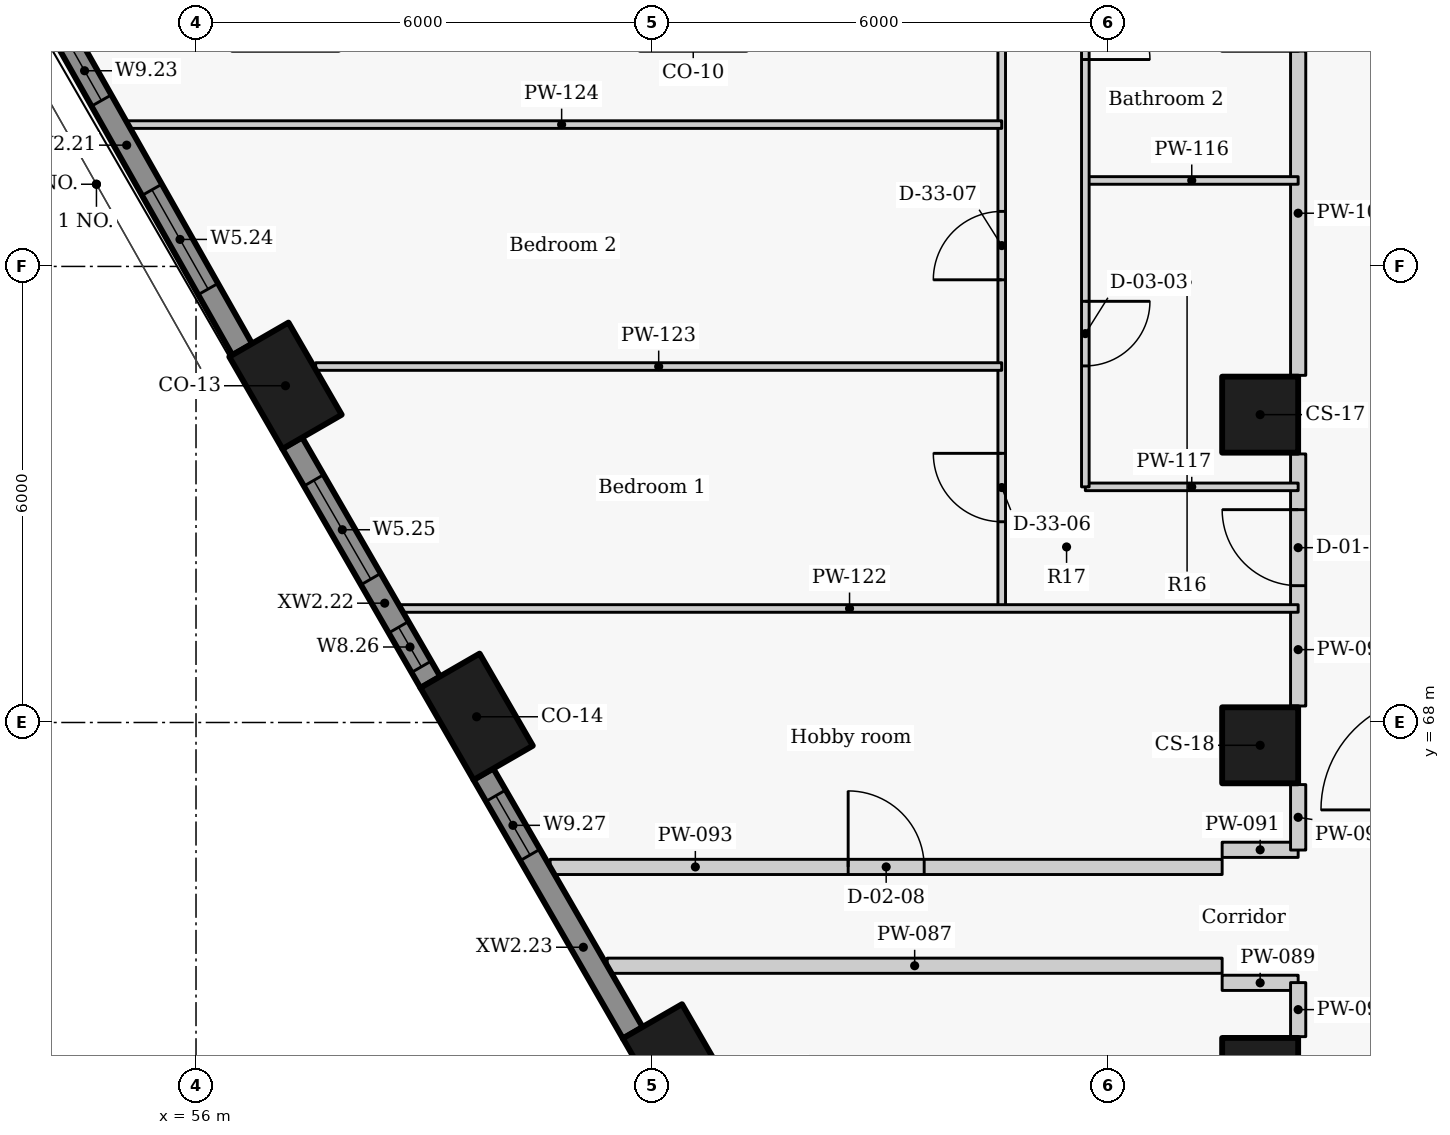
"""IFC4 building model, lengths in metres.
Left out: names, types, materials, properties, quantities, classifications, styles, units other than length and angle.
Written with IfcOpenShell. Run it as: python <this file> out.ifc"""

import sys

from ifc_helpers import new_model, si_unit, direction, frame, frame_2d, origin, origin_2d, place, context, subcontext, project, spatial, rectangle, extrude, element, fill, save


model = new_model("IFC4")
c1 = context("Model", 3, precision=1e-05, world=origin(), true_north=direction((0.0, 1.0)))
c2 = subcontext(c1, "Body", "Model", "MODEL_VIEW")
j1 = project(units=[si_unit("LENGTHUNIT", "METRE"), si_unit("PLANEANGLEUNIT", "RADIAN")], contexts=[c1])
p1 = place(None, origin())
s1 = spatial("IfcSite", under=j1, at=p1, CompositionType="ELEMENT")
p2 = place(p1, origin())
s2 = spatial("IfcBuilding", under=s1, at=p2, CompositionType="ELEMENT")
p3 = place(p2, frame((0.0, 0.0, 87.6)))
s3 = spatial("IfcBuildingStorey", under=s2, at=p3, CompositionType="ELEMENT", Elevation=87.6)
for number, where, z_axis, x_axis in (
    (1, (57.177, 72.43, 0.0), (0.0, 0.0, 1.0), (0.5, -0.866, 0.0)),
    (2, (59.692, 68.075, 0.0), (0.0, 0.0, 1.0), (0.5, -0.866, 0.0)),
    (3, (62.354, 63.463, 0.0), (0.0, 0.0, 1.0), (0.5, -0.866, 0.0)),
):
    element("IfcColumn", number, at=place(p3, frame(where, z_axis=z_axis, x_axis=x_axis)), inside=s3, PredefinedType="COLUMN", context=c2, shape_type="SweptSolid", body=[
        extrude(rectangle(XDim=1.4, YDim=0.9, at=origin_2d()), origin(), (0.0, 0.0, 1.0), 3.3),
    ])
for number, where, z_axis, x_axis in (
    (4, (70.0, 72.05, 0.0), (0.0, 0.0, 1.0), (0.0, -1.0, 0.0)),
    (5, (70.0, 67.7, 0.0), (0.0, 0.0, 1.0), (0.0, -1.0, 0.0)),
    (6, (70.0, 63.35, 0.0), (0.0, 0.0, 1.0), (0.0, -1.0, 0.0)),
):
    element("IfcColumn", number, at=place(p3, frame(where, z_axis=z_axis, x_axis=x_axis)), inside=s3, PredefinedType="COLUMN", context=c2, shape_type="SweptSolid", body=[
        extrude(rectangle(XDim=1.0, YDim=1.0, at=origin_2d()), origin(), (0.0, 0.0, 1.0), 3.3),
    ])
p4 = place(p3, frame((53.814, 77.847, 0.0), z_axis=(0.0, 0.0, 1.0), x_axis=(0.492456858874, -0.870336855561, 0.0)))
e7 = element("IfcWall", 7, at=p4, inside=s3, PredefinedType="SOLIDWALL", context=c2, shape_type="SweptSolid", body=[
    extrude(rectangle(XDim=5.677, YDim=0.3, at=frame_2d((2.838, 0.0))), origin(), (0.0, 0.0, 1.0), 2.425),
])
p5 = place(p4, frame((1.012, 0.0, 0.9)))
e8 = element("IfcOpeningElement", 8, at=p5, cuts=e7, PredefinedType="OPENING", context=c2, shape_type="SweptSolid", body=[
    extrude(rectangle(XDim=0.9, YDim=1.1, at=frame_2d((0.45, 0.55))), frame((0.0, 0.16, 0.0), z_axis=(0.0, -1.0, 0.0), x_axis=(1.0, 0.0, 0.0)), (0.0, 0.0, 1.0), 0.32),
])
p6 = place(p4, frame((3.261, 0.0, 0.9)))
e9 = element("IfcOpeningElement", 9, at=p6, cuts=e7, PredefinedType="OPENING", context=c2, shape_type="SweptSolid", body=[
    extrude(rectangle(XDim=1.5, YDim=1.1, at=frame_2d((0.75, 0.55))), frame((0.0, 0.16, 0.0), z_axis=(0.0, -1.0, 0.0), x_axis=(1.0, 0.0, 0.0)), (0.0, 0.0, 1.0), 0.32),
])
p7 = place(p3, frame((57.265, 71.677, 0.0), z_axis=(0.0, 0.0, 1.0), x_axis=(0.500009139881, -0.866020126807, 0.0)))
e10 = element("IfcWall", 10, at=p7, inside=s3, PredefinedType="SOLIDWALL", context=c2, shape_type="SweptSolid", body=[
    extrude(rectangle(XDim=3.637, YDim=0.3, at=frame_2d((1.818, 0.0))), origin(), (0.0, 0.0, 1.0), 2.425),
])
p8 = place(p7, frame((0.568, 0.0, 0.9)))
e11 = element("IfcOpeningElement", 11, at=p8, cuts=e10, PredefinedType="OPENING", context=c2, shape_type="SweptSolid", body=[
    extrude(rectangle(XDim=1.5, YDim=1.1, at=frame_2d((0.75, 0.55))), frame((0.0, 0.16, 0.0), z_axis=(0.0, -1.0, 0.0), x_axis=(1.0, 0.0, 0.0)), (0.0, 0.0, 1.0), 0.32),
])
p9 = place(p7, frame((2.8, 0.0, 0.9)))
e12 = element("IfcOpeningElement", 12, at=p9, cuts=e10, PredefinedType="OPENING", context=c2, shape_type="SweptSolid", body=[
    extrude(rectangle(XDim=0.6, YDim=1.1, at=frame_2d((0.3, 0.55))), frame((0.0, 0.16, 0.0), z_axis=(0.0, -1.0, 0.0), x_axis=(1.0, 0.0, 0.0)), (0.0, 0.0, 1.0), 0.32),
])
p10 = place(p3, frame((59.78, 67.323, 0.0), z_axis=(0.0, 0.0, 1.0), x_axis=(0.499957037901, -0.866050206543, 0.0)))
e13 = element("IfcWall", 13, at=p10, inside=s3, PredefinedType="SOLIDWALL", context=c2, shape_type="SweptSolid", body=[
    extrude(rectangle(XDim=3.934, YDim=0.3, at=frame_2d((1.967, 0.0))), origin(), (0.0, 0.0, 1.0), 2.425),
])
p11 = place(p10, frame((0.33, 0.0, 0.9)))
e14 = element("IfcOpeningElement", 14, at=p11, cuts=e13, PredefinedType="OPENING", context=c2, shape_type="SweptSolid", body=[
    extrude(rectangle(XDim=0.9, YDim=1.1, at=frame_2d((0.45, 0.55))), frame((0.0, 0.16, 0.0), z_axis=(0.0, -1.0, 0.0), x_axis=(1.0, 0.0, 0.0)), (0.0, 0.0, 1.0), 0.32),
])
p12 = place(p3, frame((61.409, 64.8, 0.0), z_axis=(0.0, 0.0, 1.0), x_axis=(1.0, 0.0, 0.0)))
e15 = element("IfcWall", 15, at=p12, inside=s3, PredefinedType="PARTITIONING", context=c2, shape_type="SweptSolid", body=[
    extrude(rectangle(XDim=8.091, YDim=0.2, at=frame_2d((4.045, 0.0))), origin(), (0.0, 0.0, 1.0), 2.405),
])
for number, where, z_axis, x_axis in (
    (16, (69.5, 64.575, 0.0), (0.0, 0.0, 1.0), (1.0, 0.0, 0.0)),
    (17, (69.5, 66.325, 0.0), (0.0, 0.0, 1.0), (1.0, 0.0, 0.0)),
):
    element("IfcWall", number, at=place(p3, frame(where, z_axis=z_axis, x_axis=x_axis)), inside=s3, PredefinedType="PARTITIONING", context=c2, shape_type="SweptSolid", body=[
        extrude(rectangle(XDim=1.0, YDim=0.2, at=frame_2d((0.5, 0.0))), origin(), (0.0, 0.0, 1.0), 2.505),
    ])
p13 = place(p3, frame((60.659, 66.1, 0.0), z_axis=(0.0, 0.0, 1.0), x_axis=(1.0, 0.0, 0.0)))
e18 = element("IfcWall", 18, at=p13, inside=s3, PredefinedType="PARTITIONING", context=c2, shape_type="SweptSolid", body=[
    extrude(rectangle(XDim=8.841, YDim=0.2, at=frame_2d((4.421, 0.0))), origin(), (0.0, 0.0, 1.0), 2.405),
])
p14 = place(p13, frame((3.921, 0.0, 0.0)))
e19 = element("IfcOpeningElement", 19, at=p14, cuts=e18, PredefinedType="OPENING", context=c2, shape_type="SweptSolid", body=[
    extrude(rectangle(XDim=1.0, YDim=2.1, at=frame_2d((0.5, 1.05))), frame((0.0, 0.11, 0.0), z_axis=(0.0, -1.0, 0.0), x_axis=(1.0, 0.0, 0.0)), (0.0, 0.0, 1.0), 0.22),
])
p15 = place(p3, frame((70.5, 63.867, 0.0), z_axis=(0.0, 0.0, 1.0), x_axis=(0.0, 1.0, 0.0)))
e20 = element("IfcWall", 20, at=p15, inside=s3, PredefinedType="PARTITIONING", context=c2, shape_type="SweptSolid", body=[
    extrude(rectangle(XDim=0.711, YDim=0.2, at=frame_2d((0.355, 0.0))), origin(), (0.0, 0.0, 1.0), 3.025),
])
p16 = place(p3, frame((70.5, 66.322, 0.0), z_axis=(0.0, 0.0, 1.0), x_axis=(0.0, 1.0, 0.0)))
e21 = element("IfcWall", 21, at=p16, inside=s3, PredefinedType="PARTITIONING", context=c2, shape_type="SweptSolid", body=[
    extrude(rectangle(XDim=0.861, YDim=0.2, at=frame_2d((0.431, 0.0))), origin(), (0.0, 0.0, 1.0), 3.025),
])
p17 = place(p3, frame((70.5, 68.217, 0.0), z_axis=(0.0, 0.0, 1.0), x_axis=(0.0, 1.0, 0.0)))
e22 = element("IfcWall", 22, at=p17, inside=s3, PredefinedType="PARTITIONING", context=c2, shape_type="SweptSolid", body=[
    extrude(rectangle(XDim=3.316, YDim=0.2, at=frame_2d((1.658, 0.0))), origin(), (0.0, 0.0, 1.0), 3.025),
])
p18 = place(p17, frame((1.583, 0.0, 0.0)))
e23 = element("IfcOpeningElement", 23, at=p18, cuts=e22, PredefinedType="OPENING", context=c2, shape_type="SweptSolid", body=[
    extrude(rectangle(XDim=1.0, YDim=2.1, at=frame_2d((0.5, 1.05))), frame((0.0, 0.11, 0.0), z_axis=(0.0, -1.0, 0.0), x_axis=(1.0, 0.0, 0.0)), (0.0, 0.0, 1.0), 0.22),
])
p19 = place(p3, frame((70.5, 72.567, 0.0), z_axis=(0.0, 0.0, 1.0), x_axis=(0.0, 1.0, 0.0)))
e24 = element("IfcWall", 24, at=p19, inside=s3, PredefinedType="PARTITIONING", context=c2, shape_type="SweptSolid", body=[
    extrude(rectangle(XDim=4.266, YDim=0.2, at=frame_2d((2.133, 0.0))), origin(), (0.0, 0.0, 1.0), 3.025),
])
for number, where, z_axis, x_axis in (
    (25, (67.7, 75.131, 0.0), (0.0, 0.0, 1.0), (1.0, 0.0, 0.0)),
    (26, (67.7, 71.1, 0.0), (0.0, 0.0, 1.0), (1.0, 0.0, 0.0)),
):
    element("IfcWall", number, at=place(p3, frame(where, z_axis=z_axis, x_axis=x_axis)), inside=s3, PredefinedType="PARTITIONING", context=c2, shape_type="SweptSolid", body=[
        extrude(rectangle(XDim=2.8, YDim=0.1, at=frame_2d((1.4, 0.0))), origin(), (0.0, 0.0, 1.0), 2.505),
    ])
p20 = place(p3, frame((67.7, 84.0, 0.0), z_axis=(0.0, 0.0, 1.0), x_axis=(0.0, -1.0, 0.0)))
e27 = element("IfcWall", 27, at=p20, inside=s3, PredefinedType="PARTITIONING", context=c2, shape_type="SweptSolid", body=[
    extrude(rectangle(XDim=12.9, YDim=0.1, at=frame_2d((6.45, 0.0))), origin(), (0.0, 0.0, 1.0), 3.025),
])
p21 = place(p20, frame((10.459, 0.0, 0.0)))
e28 = element("IfcOpeningElement", 28, at=p21, cuts=e27, PredefinedType="OPENING", context=c2, shape_type="SweptSolid", body=[
    extrude(rectangle(XDim=0.85, YDim=2.1, at=frame_2d((0.425, 1.05))), frame((0.0, 0.06, 0.0), z_axis=(0.0, -1.0, 0.0), x_axis=(1.0, 0.0, 0.0)), (0.0, 0.0, 1.0), 0.12),
])
p22 = place(p20, frame((6.428, 0.0, 0.0)))
e29 = element("IfcOpeningElement", 29, at=p22, cuts=e27, PredefinedType="OPENING", context=c2, shape_type="SweptSolid", body=[
    extrude(rectangle(XDim=0.85, YDim=2.1, at=frame_2d((0.425, 1.05))), frame((0.0, 0.06, 0.0), z_axis=(0.0, -1.0, 0.0), x_axis=(1.0, 0.0, 0.0)), (0.0, 0.0, 1.0), 0.12),
])
p23 = place(p20, frame((1.969, 0.0, 0.0)))
e30 = element("IfcOpeningElement", 30, at=p23, cuts=e27, PredefinedType="OPENING", context=c2, shape_type="SweptSolid", body=[
    extrude(rectangle(XDim=0.9, YDim=2.1, at=frame_2d((0.45, 1.05))), frame((0.0, 0.06, 0.0), z_axis=(0.0, -1.0, 0.0), x_axis=(1.0, 0.0, 0.0)), (0.0, 0.0, 1.0), 0.12),
])
p24 = place(p3, frame((66.6, 69.5, 0.0), z_axis=(0.0, 0.0, 1.0), x_axis=(0.0, 1.0, 0.0)))
e31 = element("IfcWall", 31, at=p24, inside=s3, PredefinedType="PARTITIONING", context=c2, shape_type="SweptSolid", body=[
    extrude(rectangle(XDim=14.5, YDim=0.1, at=frame_2d((7.25, 0.0))), origin(), (0.0, 0.0, 1.0), 3.025),
])
p25 = place(p24, frame((1.141, 0.0, 0.0)))
e32 = element("IfcOpeningElement", 32, at=p25, cuts=e31, PredefinedType="OPENING", context=c2, shape_type="SweptSolid", body=[
    extrude(rectangle(XDim=0.9, YDim=2.1, at=frame_2d((0.45, 1.05))), frame((0.0, 0.06, 0.0), z_axis=(0.0, -1.0, 0.0), x_axis=(1.0, 0.0, 0.0)), (0.0, 0.0, 1.0), 0.12),
])
p26 = place(p24, frame((4.324, 0.0, 0.0)))
e33 = element("IfcOpeningElement", 33, at=p26, cuts=e31, PredefinedType="OPENING", context=c2, shape_type="SweptSolid", body=[
    extrude(rectangle(XDim=0.9, YDim=2.1, at=frame_2d((0.45, 1.05))), frame((0.0, 0.06, 0.0), z_axis=(0.0, -1.0, 0.0), x_axis=(1.0, 0.0, 0.0)), (0.0, 0.0, 1.0), 0.12),
])
p27 = place(p24, frame((8.391, 0.0, 0.0)))
e34 = element("IfcOpeningElement", 34, at=p27, cuts=e31, PredefinedType="OPENING", context=c2, shape_type="SweptSolid", body=[
    extrude(rectangle(XDim=0.9, YDim=2.1, at=frame_2d((0.45, 1.05))), frame((0.0, 0.06, 0.0), z_axis=(0.0, -1.0, 0.0), x_axis=(1.0, 0.0, 0.0)), (0.0, 0.0, 1.0), 0.12),
])
p28 = place(p24, frame((12.459, 0.0, 0.0)))
e35 = element("IfcOpeningElement", 35, at=p28, cuts=e31, PredefinedType="OPENING", context=c2, shape_type="SweptSolid", body=[
    extrude(rectangle(XDim=0.9, YDim=2.1, at=frame_2d((0.45, 1.05))), frame((0.0, 0.06, 0.0), z_axis=(0.0, -1.0, 0.0), x_axis=(1.0, 0.0, 0.0)), (0.0, 0.0, 1.0), 0.12),
])
p29 = place(p3, frame((58.696, 69.5, 0.0), z_axis=(0.0, 0.0, 1.0), x_axis=(1.0, 0.0, 0.0)))
e36 = element("IfcWall", 36, at=p29, inside=s3, PredefinedType="PARTITIONING", context=c2, shape_type="SweptSolid", body=[
    extrude(rectangle(XDim=11.804, YDim=0.1, at=frame_2d((5.902, 0.0))), origin(), (0.0, 0.0, 1.0), 2.405),
])
p30 = place(p3, frame((57.574, 72.683, 0.0), z_axis=(0.0, 0.0, 1.0), x_axis=(1.0, 0.0, 0.0)))
e37 = element("IfcWall", 37, at=p30, inside=s3, PredefinedType="PARTITIONING", context=c2, shape_type="SweptSolid", body=[
    extrude(rectangle(XDim=9.026, YDim=0.1, at=frame_2d((4.513, 0.0))), origin(), (0.0, 0.0, 1.0), 3.025),
])
p31 = place(p3, frame((55.021, 75.866, 0.0), z_axis=(0.0, 0.0, 1.0), x_axis=(1.0, 0.0, 0.0)))
e38 = element("IfcWall", 38, at=p31, inside=s3, PredefinedType="PARTITIONING", context=c2, shape_type="SweptSolid", body=[
    extrude(rectangle(XDim=11.58, YDim=0.1, at=frame_2d((5.79, 0.0))), origin(), (0.0, 0.0, 1.0), 2.405),
])
p32 = place(p5, origin())
e39 = element("IfcWindow", 39, at=p32, inside=s3, PartitioningType="SINGLE_PANEL", PredefinedType="WINDOW", context=c2, shape_type="SweptSolid", body=[
    extrude(rectangle(XDim=0.9, YDim=1.1, at=frame_2d((0.45, 0.55))), frame((0.0, 0.03, 0.0), z_axis=(0.0, -1.0, 0.0), x_axis=(1.0, 0.0, 0.0)), (0.0, 0.0, 1.0), 0.06),
])
fill(e8, e39)
p33 = place(p6, origin())
e40 = element("IfcWindow", 40, at=p33, inside=s3, PartitioningType="SINGLE_PANEL", PredefinedType="WINDOW", context=c2, shape_type="SweptSolid", body=[
    extrude(rectangle(XDim=1.5, YDim=1.1, at=frame_2d((0.75, 0.55))), frame((0.0, 0.03, 0.0), z_axis=(0.0, -1.0, 0.0), x_axis=(1.0, 0.0, 0.0)), (0.0, 0.0, 1.0), 0.06),
])
fill(e9, e40)
p34 = place(p8, origin())
e41 = element("IfcWindow", 41, at=p34, inside=s3, PartitioningType="SINGLE_PANEL", PredefinedType="WINDOW", context=c2, shape_type="SweptSolid", body=[
    extrude(rectangle(XDim=1.5, YDim=1.1, at=frame_2d((0.75, 0.55))), frame((0.0, 0.03, 0.0), z_axis=(0.0, -1.0, 0.0), x_axis=(1.0, 0.0, 0.0)), (0.0, 0.0, 1.0), 0.06),
])
fill(e11, e41)
p35 = place(p9, origin())
e42 = element("IfcWindow", 42, at=p35, inside=s3, PartitioningType="SINGLE_PANEL", PredefinedType="WINDOW", context=c2, shape_type="SweptSolid", body=[
    extrude(rectangle(XDim=0.6, YDim=1.1, at=frame_2d((0.3, 0.55))), frame((0.0, 0.03, 0.0), z_axis=(0.0, -1.0, 0.0), x_axis=(1.0, 0.0, 0.0)), (0.0, 0.0, 1.0), 0.06),
])
fill(e12, e42)
p36 = place(p11, origin())
e43 = element("IfcWindow", 43, at=p36, inside=s3, PartitioningType="SINGLE_PANEL", PredefinedType="WINDOW", context=c2, shape_type="SweptSolid", body=[
    extrude(rectangle(XDim=0.9, YDim=1.1, at=frame_2d((0.45, 0.55))), frame((0.0, 0.03, 0.0), z_axis=(0.0, -1.0, 0.0), x_axis=(1.0, 0.0, 0.0)), (0.0, 0.0, 1.0), 0.06),
])
fill(e14, e43)
p37 = place(p18, origin())
e44 = element("IfcDoor", 44, at=p37, inside=s3, OperationType="SINGLE_SWING_RIGHT", PredefinedType="DOOR", context=c2, shape_type="SweptSolid", body=[
    extrude(rectangle(XDim=1.0, YDim=2.1, at=frame_2d((0.5, 1.05))), frame((0.0, 0.025, 0.0), z_axis=(0.0, -1.0, 0.0), x_axis=(1.0, 0.0, 0.0)), (0.0, 0.0, 1.0), 0.05),
])
fill(e23, e44)
p38 = place(p21, origin())
e45 = element("IfcDoor", 45, at=p38, inside=s3, OperationType="SINGLE_SWING_LEFT", PredefinedType="DOOR", context=c2, shape_type="SweptSolid", body=[
    extrude(rectangle(XDim=0.85, YDim=2.1, at=frame_2d((0.425, 1.05))), frame((0.0, 0.025, 0.0), z_axis=(0.0, -1.0, 0.0), x_axis=(1.0, 0.0, 0.0)), (0.0, 0.0, 1.0), 0.05),
])
fill(e28, e45)
p39 = place(p22, origin())
e46 = element("IfcDoor", 46, at=p39, inside=s3, OperationType="SINGLE_SWING_RIGHT", PredefinedType="DOOR", context=c2, shape_type="SweptSolid", body=[
    extrude(rectangle(XDim=0.85, YDim=2.1, at=frame_2d((0.425, 1.05))), frame((0.0, 0.025, 0.0), z_axis=(0.0, -1.0, 0.0), x_axis=(1.0, 0.0, 0.0)), (0.0, 0.0, 1.0), 0.05),
])
fill(e29, e46)
p40 = place(p25, origin())
e47 = element("IfcDoor", 47, at=p40, inside=s3, OperationType="SINGLE_SWING_RIGHT", PredefinedType="DOOR", context=c2, shape_type="SweptSolid", body=[
    extrude(rectangle(XDim=0.9, YDim=2.1, at=frame_2d((0.45, 1.05))), frame((0.0, 0.025, 0.0), z_axis=(0.0, -1.0, 0.0), x_axis=(1.0, 0.0, 0.0)), (0.0, 0.0, 1.0), 0.05),
])
fill(e32, e47)
p41 = place(p26, origin())
e48 = element("IfcDoor", 48, at=p41, inside=s3, OperationType="SINGLE_SWING_LEFT", PredefinedType="DOOR", context=c2, shape_type="SweptSolid", body=[
    extrude(rectangle(XDim=0.9, YDim=2.1, at=frame_2d((0.45, 1.05))), frame((0.0, 0.025, 0.0), z_axis=(0.0, -1.0, 0.0), x_axis=(1.0, 0.0, 0.0)), (0.0, 0.0, 1.0), 0.05),
])
fill(e33, e48)
p42 = place(p14, origin())
e49 = element("IfcDoor", 49, at=p42, inside=s3, OperationType="SINGLE_SWING_LEFT", PredefinedType="DOOR", context=c2, shape_type="SweptSolid", body=[
    extrude(rectangle(XDim=1.0, YDim=2.1, at=frame_2d((0.5, 1.05))), frame((0.0, 0.025, 0.0), z_axis=(0.0, -1.0, 0.0), x_axis=(1.0, 0.0, 0.0)), (0.0, 0.0, 1.0), 0.05),
])
fill(e19, e49)
save(model, sys.argv[1])
